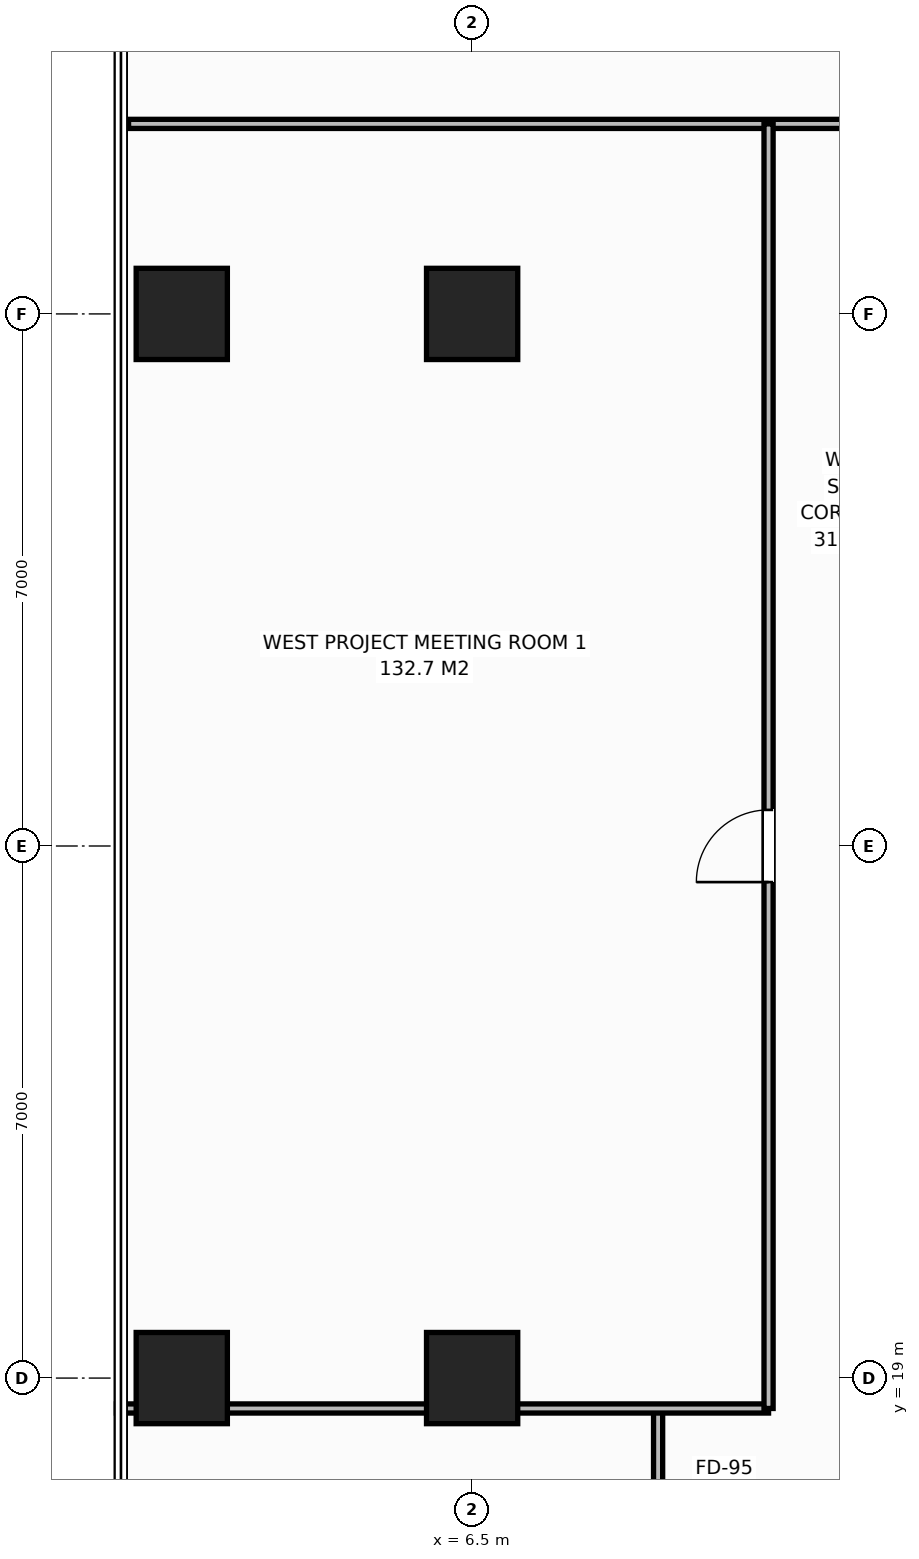
"""IFC4 building model, lengths in metres.
Left out: names, types, materials, properties, quantities, classifications, styles, units other than length and angle.
Written with IfcOpenShell. Run it as: python <this file> out.ifc"""

import sys

from ifc_helpers import new_model, si_unit, direction, frame, frame_2d, origin, origin_2d, place, context, subcontext, project, spatial, rectangle, extrude, element, fill, save


model = new_model("IFC4")
c1 = context("Model", 3, precision=1e-05, world=origin(), true_north=direction((0.0, 1.0)))
c2 = subcontext(c1, "Body", "Model", "MODEL_VIEW")
j1 = project(units=[si_unit("LENGTHUNIT", "METRE"), si_unit("PLANEANGLEUNIT", "RADIAN")], contexts=[c1])
p1 = place(None, origin())
s1 = spatial("IfcSite", under=j1, at=p1, CompositionType="ELEMENT")
p2 = place(p1, origin())
s2 = spatial("IfcBuilding", under=s1, at=p2, CompositionType="ELEMENT")
p3 = place(p2, frame((0.0, 0.0, 93.6)))
s3 = spatial("IfcBuildingStorey", under=s2, at=p3, CompositionType="ELEMENT", Elevation=93.6)
for number, where, z_axis, x_axis in (
    (1, (6.5, 19.0, 0.0), (0.0, 0.0, 1.0), (1.0, 0.0, 0.0)),
    (2, (6.5, 33.0, 0.0), (0.0, 0.0, 1.0), (1.0, 0.0, 0.0)),
    (3, (2.68, 19.0, 0.0), (0.0, 0.0, 1.0), (1.0, 0.0, 0.0)),
    (4, (2.68, 33.0, 0.0), (0.0, 0.0, 1.0), (1.0, 0.0, 0.0)),
):
    element("IfcColumn", number, at=place(p3, frame(where, z_axis=z_axis, x_axis=x_axis)), inside=s3, PredefinedType="COLUMN", context=c2, shape_type="SweptSolid", body=[
        extrude(rectangle(XDim=1.2, YDim=1.2, at=origin_2d()), origin(), (0.0, 0.0, 1.0), 3.8),
    ])
p4 = place(p3, frame((8.947, 16.5, 0.0), z_axis=(0.0, 0.0, 1.0), x_axis=(0.0, 1.0, 0.0)))
e5 = element("IfcWall", 5, at=p4, inside=s3, PredefinedType="PARTITIONING", context=c2, shape_type="SweptSolid", body=[
    extrude(rectangle(XDim=2.1, YDim=0.12, at=frame_2d((1.05, 0.0))), origin(), (0.0, 0.0, 1.0), 3.565),
])
p5 = place(p3, frame((1.98, 35.5, 0.0), z_axis=(0.0, 0.0, 1.0), x_axis=(1.0, 0.0, 0.0)))
e6 = element("IfcWall", 6, at=p5, inside=s3, PredefinedType="PARTITIONING", context=c2, shape_type="SweptSolid", body=[
    extrude(rectangle(XDim=19.339, YDim=0.12, at=frame_2d((9.669, 0.0))), origin(), (0.0, 0.0, 1.0), 3.565),
])
p6 = place(p5, frame((13.404, 0.0, 0.0)))
e7 = element("IfcOpeningElement", 7, at=p6, cuts=e6, PredefinedType="OPENING", context=c2, shape_type="SweptSolid", body=[
    extrude(rectangle(XDim=0.95, YDim=2.15, at=frame_2d((0.475, 1.075))), frame((0.0, 0.07, 0.0), z_axis=(0.0, -1.0, 0.0), x_axis=(1.0, 0.0, 0.0)), (0.0, 0.0, 1.0), 0.14),
])
p7 = place(p3, frame((1.82, 18.6, 0.0), z_axis=(0.0, 0.0, 1.0), x_axis=(1.0, 0.0, 0.0)))
e8 = element("IfcWall", 8, at=p7, inside=s3, PredefinedType="PARTITIONING", context=c2, shape_type="SweptSolid", body=[
    extrude(rectangle(XDim=8.58, YDim=0.12, at=frame_2d((4.29, 0.0))), origin(), (0.0, 0.0, 1.0), 3.565),
])
p8 = place(p3, frame((10.4, 18.6, 0.0), z_axis=(0.0, 0.0, 1.0), x_axis=(0.0, 1.0, 0.0)))
e9 = element("IfcWall", 9, at=p8, inside=s3, PredefinedType="PARTITIONING", context=c2, shape_type="SweptSolid", body=[
    extrude(rectangle(XDim=16.9, YDim=0.12, at=frame_2d((8.45, 0.0))), origin(), (0.0, 0.0, 1.0), 3.565),
])
p9 = place(p8, frame((6.925, 0.0, 0.0)))
e10 = element("IfcOpeningElement", 10, at=p9, cuts=e9, PredefinedType="OPENING", context=c2, shape_type="SweptSolid", body=[
    extrude(rectangle(XDim=0.95, YDim=2.15, at=frame_2d((0.475, 1.075))), frame((0.0, 0.07, 0.0), z_axis=(0.0, -1.0, 0.0), x_axis=(1.0, 0.0, 0.0)), (0.0, 0.0, 1.0), 0.14),
])
p10 = place(p9, origin())
e11 = element("IfcDoor", 11, at=p10, inside=s3, OperationType="SINGLE_SWING_LEFT", PredefinedType="DOOR", context=c2, shape_type="SweptSolid", body=[
    extrude(rectangle(XDim=0.95, YDim=2.15, at=frame_2d((0.475, 1.075))), frame((0.0, 0.025, 0.0), z_axis=(0.0, -1.0, 0.0), x_axis=(1.0, 0.0, 0.0)), (0.0, 0.0, 1.0), 0.05),
])
fill(e10, e11)
save(model, sys.argv[1])
